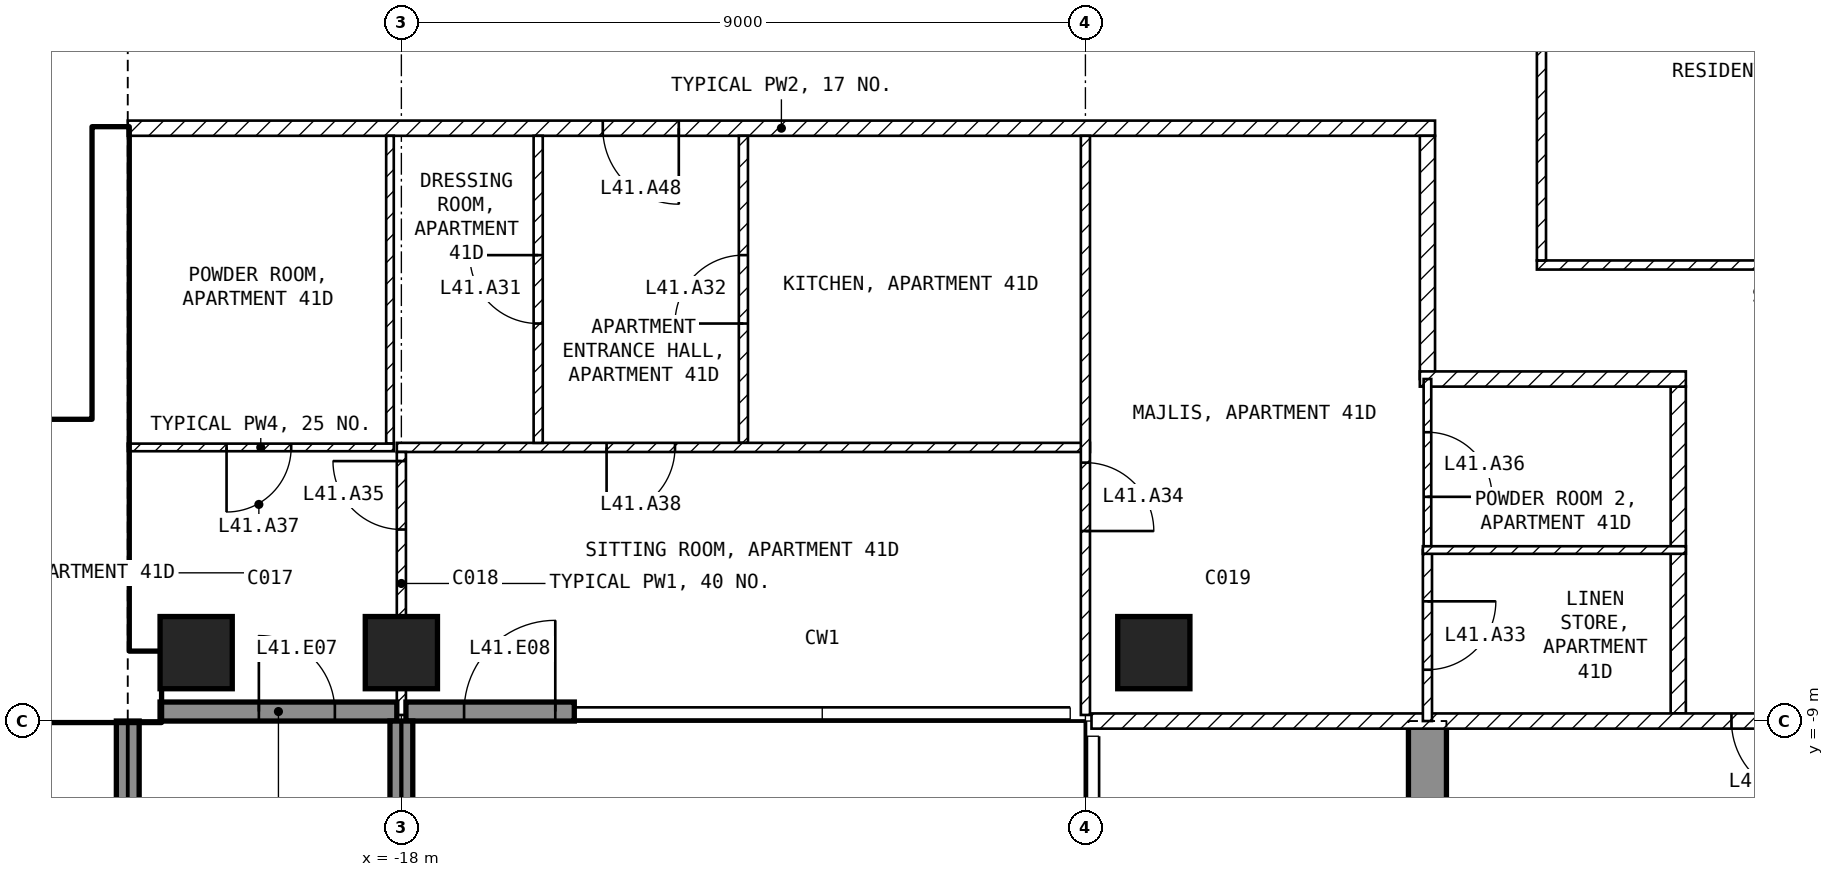
"""IFC4 building model, lengths in metres.
Left out: names, types, materials, properties, quantities, classifications, styles, units other than length and angle.
Written with IfcOpenShell. Run it as: python <this file> out.ifc"""

import sys

from ifc_helpers import new_model, si_unit, direction, frame, frame_2d, origin, origin_2d, place, context, subcontext, project, spatial, polyline, rectangle, outline, extrude, element, fill, save


model = new_model("IFC4")
c1 = context("Model", 3, precision=1e-05, world=origin(), true_north=direction((0.0, 1.0)))
c2 = subcontext(c1, "Body", "Model", "MODEL_VIEW")
j1 = project(units=[si_unit("LENGTHUNIT", "METRE"), si_unit("PLANEANGLEUNIT", "RADIAN")], contexts=[c1])
p1 = place(None, origin())
s1 = spatial("IfcSite", under=j1, at=p1, CompositionType="ELEMENT")
p2 = place(p1, origin())
s2 = spatial("IfcBuilding", under=s1, at=p2, CompositionType="ELEMENT")
p3 = place(p2, frame((0.0, 0.0, 170.1)))
s3 = spatial("IfcBuildingStorey", under=s2, at=p3, CompositionType="ELEMENT", Elevation=170.1)
for number, where, z_axis, x_axis in (
    (1, (-20.7, -8.1, -0.25), (0.0, 0.0, 1.0), (1.0, 0.0, 0.0)),
    (2, (-18.0, -8.1, -0.25), (0.0, 0.0, 1.0), (1.0, 0.0, 0.0)),
    (3, (-8.1, -8.1, -0.25), (0.0, 0.0, 1.0), (1.0, 0.0, 0.0)),
):
    element("IfcColumn", number, at=place(p3, frame(where, z_axis=z_axis, x_axis=x_axis)), inside=s3, PredefinedType="COLUMN", context=c2, shape_type="SweptSolid", body=[
        extrude(rectangle(XDim=0.95, YDim=0.95, at=origin_2d()), origin(), (0.0, 0.0, 1.0), 3.5),
    ])
p4 = place(p3, frame((-4.75, -20.225, -0.25), z_axis=(1.0, 0.0, 0.0), x_axis=(0.0, 1.0, 0.0)))
e4 = element("IfcWall", 4, at=p4, inside=s3, PredefinedType="SHEAR", context=c2, shape_type="SweptSolid", body=[
    extrude(outline(polyline([(0.0, 0.0), (6.725, 0.0), (6.725, 2.65), (9.125, 2.65), (9.125, 0.0), (11.225, 0.0), (11.225, 3.5), (0.0, 3.5), (0.0, 0.0)])), origin(), (0.0, 0.0, 1.0), 0.5),
])
p5 = place(p3, frame((-21.175, -8.875, 0.0), z_axis=(0.0, 0.0, 1.0), x_axis=(1.0, 0.0, 0.0)))
e5 = element("IfcWall", 5, at=p5, inside=s3, PredefinedType="SOLIDWALL", context=c2, shape_type="SweptSolid", body=[
    extrude(rectangle(XDim=3.115, YDim=0.25, at=frame_2d((1.558, 0.0))), origin(), (0.0, 0.0, 1.0), 3.25),
])
p6 = place(p5, frame((1.3, 0.0, 0.0)))
e6 = element("IfcOpeningElement", 6, at=p6, cuts=e5, PredefinedType="OPENING", context=c2, shape_type="SweptSolid", body=[
    extrude(rectangle(XDim=1.0, YDim=2.4, at=frame_2d((0.5, 1.2))), frame((0.0, 0.135, 0.0), z_axis=(0.0, -1.0, 0.0), x_axis=(1.0, 0.0, 0.0)), (0.0, 0.0, 1.0), 0.27),
])
p7 = place(p3, frame((-17.94, -8.875, 0.0), z_axis=(0.0, 0.0, 1.0), x_axis=(1.0, 0.0, 0.0)))
e7 = element("IfcWall", 7, at=p7, inside=s3, PredefinedType="SOLIDWALL", context=c2, shape_type="SweptSolid", body=[
    extrude(rectangle(XDim=2.215, YDim=0.25, at=frame_2d((1.107, 0.0))), origin(), (0.0, 0.0, 1.0), 3.25),
])
p8 = place(p7, frame((0.765, 0.0, 0.0)))
e8 = element("IfcOpeningElement", 8, at=p8, cuts=e7, PredefinedType="OPENING", context=c2, shape_type="SweptSolid", body=[
    extrude(rectangle(XDim=1.2, YDim=2.4, at=frame_2d((0.6, 1.2))), frame((0.0, 0.135, 0.0), z_axis=(0.0, -1.0, 0.0), x_axis=(1.0, 0.0, 0.0)), (0.0, 0.0, 1.0), 0.27),
])
for number, where, z_axis, x_axis in (
    (9, (-21.6, -9.0, 0.0), (0.0, 0.0, 1.0), (0.0, -1.0, 0.0)),
    (10, (-18.0, -9.0, 0.0), (0.0, 0.0, 1.0), (0.0, -1.0, 0.0)),
):
    element("IfcWall", number, at=place(p3, frame(where, z_axis=z_axis, x_axis=x_axis)), inside=s3, PredefinedType="SOLIDWALL", context=c2, shape_type="SweptSolid", body=[
        extrude(rectangle(XDim=2.7, YDim=0.3, at=frame_2d((1.35, 0.0))), origin(), (0.0, 0.0, 1.0), 3.25),
    ])
p9 = place(p3, frame((-30.2, -8.55, 0.0), z_axis=(0.0, 0.0, 1.0), x_axis=(1.0, 0.0, 0.0)))
e11 = element("IfcWall", 11, at=p9, inside=s3, PredefinedType="SHEAR", context=c2, shape_type="SweptSolid", body=[
    extrude(rectangle(XDim=9.025, YDim=0.9, at=frame_2d((4.512, 0.0))), origin(), (0.0, 0.0, 1.0), 3.25),
])
p10 = place(p3, frame((-21.825, -8.1, 0.0), z_axis=(0.0, 0.0, 1.0), x_axis=(0.0, 1.0, 0.0)))
e12 = element("IfcWall", 12, at=p10, inside=s3, PredefinedType="SHEAR", context=c2, shape_type="SweptSolid", body=[
    extrude(rectangle(XDim=6.9, YDim=0.45, at=frame_2d((3.45, 0.0))), origin(), (0.0, 0.0, 1.0), 3.25),
])
p11 = place(p3, frame((-28.35, -5.15, 0.0), z_axis=(0.0, 0.0, 1.0), x_axis=(1.0, 0.0, 0.0)))
e13 = element("IfcWall", 13, at=p11, inside=s3, PredefinedType="SOLIDWALL", context=c2, shape_type="SweptSolid", body=[
    extrude(rectangle(XDim=6.3, YDim=0.2, at=frame_2d((3.15, 0.0))), origin(), (0.0, 0.0, 1.0), 3.25),
])
p12 = place(p11, frame((5.1, 0.0, 0.0)))
e14 = element("IfcOpeningElement", 14, at=p12, cuts=e13, PredefinedType="OPENING", context=c2, shape_type="SweptSolid", body=[
    extrude(rectangle(XDim=1.0, YDim=2.1, at=frame_2d((0.5, 1.05))), frame((0.0, 0.11, 0.0), z_axis=(0.0, -1.0, 0.0), x_axis=(1.0, 0.0, 0.0)), (0.0, 0.0, 1.0), 0.22),
])
p13 = place(p3, frame((-3.06, -3.0, 0.0), z_axis=(0.0, 0.0, 1.0), x_axis=(1.0, 0.0, 0.0)))
e15 = element("IfcWall", 15, at=p13, inside=s3, PredefinedType="PARTITIONING", context=c2, shape_type="SweptSolid", body=[
    extrude(rectangle(XDim=6.12, YDim=0.12, at=frame_2d((3.06, 0.0))), origin(), (0.0, 0.0, 1.0), 3.25),
])
p14 = place(p3, frame((-3.0, 2.94, 0.0), z_axis=(0.0, 0.0, 1.0), x_axis=(0.0, -1.0, 0.0)))
e16 = element("IfcWall", 16, at=p14, inside=s3, PredefinedType="PARTITIONING", context=c2, shape_type="SweptSolid", body=[
    extrude(rectangle(XDim=5.88, YDim=0.12, at=frame_2d((2.94, 0.0))), origin(), (0.0, 0.0, 1.0), 3.25),
])
p15 = place(p3, frame((-4.4, -1.2, 0.0), z_axis=(0.0, 0.0, 1.0), x_axis=(-1.0, 0.0, 0.0)))
e17 = element("IfcWall", 17, at=p15, inside=s3, PredefinedType="PARTITIONING", context=c2, shape_type="SweptSolid", body=[
    extrude(rectangle(XDim=17.2, YDim=0.2, at=frame_2d((8.6, 0.0))), origin(), (0.0, 0.0, 1.0), 3.25),
])
p16 = place(p15, frame((9.95, 0.0, 0.0)))
e18 = element("IfcOpeningElement", 18, at=p16, cuts=e17, PredefinedType="OPENING", context=c2, shape_type="SweptSolid", body=[
    extrude(rectangle(XDim=1.0, YDim=2.1, at=frame_2d((0.5, 1.05))), frame((0.0, 0.11, 0.0), z_axis=(0.0, -1.0, 0.0), x_axis=(1.0, 0.0, 0.0)), (0.0, 0.0, 1.0), 0.22),
])
p17 = place(p3, frame((-4.5, -4.5, 0.0), z_axis=(0.0, 0.0, 1.0), x_axis=(0.0, 1.0, 0.0)))
e19 = element("IfcWall", 19, at=p17, inside=s3, PredefinedType="PARTITIONING", context=c2, shape_type="SweptSolid", body=[
    extrude(rectangle(XDim=3.2, YDim=0.2, at=frame_2d((1.6, 0.0))), origin(), (0.0, 0.0, 1.0), 3.25),
])
p18 = place(p3, frame((-1.2, -8.9, 0.0), z_axis=(0.0, 0.0, 1.0), x_axis=(0.0, 1.0, 0.0)))
e20 = element("IfcWall", 20, at=p18, inside=s3, PredefinedType="PARTITIONING", context=c2, shape_type="SweptSolid", body=[
    extrude(rectangle(XDim=4.3, YDim=0.2, at=frame_2d((2.15, 0.0))), origin(), (0.0, 0.0, 1.0), 3.25),
])
p19 = place(p3, frame((-1.1, -4.5, 0.0), z_axis=(0.0, 0.0, 1.0), x_axis=(-1.0, 0.0, 0.0)))
e21 = element("IfcWall", 21, at=p19, inside=s3, PredefinedType="PARTITIONING", context=c2, shape_type="SweptSolid", body=[
    extrude(rectangle(XDim=3.5, YDim=0.2, at=frame_2d((1.75, 0.0))), origin(), (0.0, 0.0, 1.0), 3.25),
])
p20 = place(p3, frame((8.92, -9.0, 0.0), z_axis=(0.0, 0.0, 1.0), x_axis=(-1.0, 0.0, 0.0)))
e22 = element("IfcWall", 22, at=p20, inside=s3, PredefinedType="PARTITIONING", context=c2, shape_type="SweptSolid", body=[
    extrude(rectangle(XDim=17.84, YDim=0.2, at=frame_2d((8.92, 0.0))), origin(), (0.0, 0.0, 1.0), 3.25),
])
p21 = place(p20, frame((8.42, 0.0, 0.0)))
e23 = element("IfcOpeningElement", 23, at=p21, cuts=e22, PredefinedType="OPENING", context=c2, shape_type="SweptSolid", body=[
    extrude(rectangle(XDim=1.0, YDim=2.1, at=frame_2d((0.5, 1.05))), frame((0.0, 0.11, 0.0), z_axis=(0.0, -1.0, 0.0), x_axis=(1.0, 0.0, 0.0)), (0.0, 0.0, 1.0), 0.22),
])
p22 = place(p3, frame((-13.5, -5.34, 0.0), z_axis=(0.0, 0.0, 1.0), x_axis=(0.0, 1.0, 0.0)))
e24 = element("IfcWall", 24, at=p22, inside=s3, PredefinedType="PARTITIONING", context=c2, shape_type="SweptSolid", body=[
    extrude(rectangle(XDim=4.04, YDim=0.12, at=frame_2d((2.02, 0.0))), origin(), (0.0, 0.0, 1.0), 3.25),
])
p23 = place(p22, frame((1.57, 0.0, 0.0)))
e25 = element("IfcOpeningElement", 25, at=p23, cuts=e24, PredefinedType="OPENING", context=c2, shape_type="SweptSolid", body=[
    extrude(rectangle(XDim=0.9, YDim=2.1, at=frame_2d((0.45, 1.05))), frame((0.0, 0.07, 0.0), z_axis=(0.0, -1.0, 0.0), x_axis=(1.0, 0.0, 0.0)), (0.0, 0.0, 1.0), 0.14),
])
p24 = place(p3, frame((-8.94, -5.4, 0.0), z_axis=(0.0, 0.0, 1.0), x_axis=(-1.0, 0.0, 0.0)))
e26 = element("IfcWall", 26, at=p24, inside=s3, PredefinedType="PARTITIONING", context=c2, shape_type="SweptSolid", body=[
    extrude(rectangle(XDim=9.12, YDim=0.12, at=frame_2d((4.56, 0.0))), origin(), (0.0, 0.0, 1.0), 3.25),
])
p25 = place(p24, frame((5.46, 0.0, 0.0)))
e27 = element("IfcOpeningElement", 27, at=p25, cuts=e26, PredefinedType="OPENING", context=c2, shape_type="SweptSolid", body=[
    extrude(rectangle(XDim=0.9, YDim=2.1, at=frame_2d((0.45, 1.05))), frame((0.0, 0.07, 0.0), z_axis=(0.0, -1.0, 0.0), x_axis=(1.0, 0.0, 0.0)), (0.0, 0.0, 1.0), 0.14),
])
p26 = place(p3, frame((-9.0, -1.3, 0.0), z_axis=(0.0, 0.0, 1.0), x_axis=(0.0, -1.0, 0.0)))
e28 = element("IfcWall", 28, at=p26, inside=s3, PredefinedType="PARTITIONING", context=c2, shape_type="SweptSolid", body=[
    extrude(rectangle(XDim=7.62, YDim=0.12, at=frame_2d((3.81, 0.0))), origin(), (0.0, 0.0, 1.0), 3.25),
])
p27 = place(p26, frame((4.3, 0.0, 0.0)))
e29 = element("IfcOpeningElement", 29, at=p27, cuts=e28, PredefinedType="OPENING", context=c2, shape_type="SweptSolid", body=[
    extrude(rectangle(XDim=0.9, YDim=2.1, at=frame_2d((0.45, 1.05))), frame((0.0, 0.07, 0.0), z_axis=(0.0, -1.0, 0.0), x_axis=(1.0, 0.0, 0.0)), (0.0, 0.0, 1.0), 0.14),
])
p28 = place(p3, frame((-16.2, -5.34, 0.0), z_axis=(0.0, 0.0, 1.0), x_axis=(0.0, 1.0, 0.0)))
e30 = element("IfcWall", 30, at=p28, inside=s3, PredefinedType="PARTITIONING", context=c2, shape_type="SweptSolid", body=[
    extrude(rectangle(XDim=4.04, YDim=0.12, at=frame_2d((2.02, 0.0))), origin(), (0.0, 0.0, 1.0), 3.25),
])
p29 = place(p28, frame((1.57, 0.0, 0.0)))
e31 = element("IfcOpeningElement", 31, at=p29, cuts=e30, PredefinedType="OPENING", context=c2, shape_type="SweptSolid", body=[
    extrude(rectangle(XDim=0.9, YDim=2.1, at=frame_2d((0.45, 1.05))), frame((0.0, 0.07, 0.0), z_axis=(0.0, -1.0, 0.0), x_axis=(1.0, 0.0, 0.0)), (0.0, 0.0, 1.0), 0.14),
])
p30 = place(p3, frame((-18.15, -5.35, 0.0), z_axis=(0.0, 0.0, 1.0), x_axis=(0.0, 1.0, 0.0)))
e32 = element("IfcWall", 32, at=p30, inside=s3, PredefinedType="PARTITIONING", context=c2, shape_type="SweptSolid", body=[
    extrude(rectangle(XDim=4.05, YDim=0.1, at=frame_2d((2.025, 0.0))), origin(), (0.0, 0.0, 1.0), 2.48),
])
p31 = place(p3, frame((-18.1, -5.4, 0.0), z_axis=(0.0, 0.0, 1.0), x_axis=(-1.0, 0.0, 0.0)))
e33 = element("IfcWall", 33, at=p31, inside=s3, PredefinedType="PARTITIONING", context=c2, shape_type="SweptSolid", body=[
    extrude(rectangle(XDim=3.5, YDim=0.1, at=frame_2d((1.75, 0.0))), origin(), (0.0, 0.0, 1.0), 3.25),
])
p32 = place(p31, frame((1.35, 0.0, 0.0)))
e34 = element("IfcOpeningElement", 34, at=p32, cuts=e33, PredefinedType="OPENING", context=c2, shape_type="SweptSolid", body=[
    extrude(rectangle(XDim=0.85, YDim=2.1, at=frame_2d((0.425, 1.05))), frame((0.0, 0.06, 0.0), z_axis=(0.0, -1.0, 0.0), x_axis=(1.0, 0.0, 0.0)), (0.0, 0.0, 1.0), 0.12),
])
p33 = place(p3, frame((-18.0, -8.92, 0.0), z_axis=(0.0, 0.0, 1.0), x_axis=(0.0, 1.0, 0.0)))
e35 = element("IfcWall", 35, at=p33, inside=s3, PredefinedType="PARTITIONING", context=c2, shape_type="SweptSolid", body=[
    extrude(rectangle(XDim=3.46, YDim=0.12, at=frame_2d((1.73, 0.0))), origin(), (0.0, 0.0, 1.0), 2.48),
])
p34 = place(p33, frame((2.44, 0.0, 0.0)))
e36 = element("IfcOpeningElement", 36, at=p34, cuts=e35, PredefinedType="OPENING", context=c2, shape_type="SweptSolid", body=[
    extrude(rectangle(XDim=0.9, YDim=2.1, at=frame_2d((0.45, 1.05))), frame((0.0, 0.07, 0.0), z_axis=(0.0, -1.0, 0.0), x_axis=(1.0, 0.0, 0.0)), (0.0, 0.0, 1.0), 0.14),
])
p35 = place(p3, frame((-4.5, -4.5, 0.0), z_axis=(0.0, 0.0, 1.0), x_axis=(0.0, -1.0, 0.0)))
e37 = element("IfcWall", 37, at=p35, inside=s3, PredefinedType="PARTITIONING", context=c2, shape_type="SweptSolid", body=[
    extrude(rectangle(XDim=2.25, YDim=0.1, at=frame_2d((1.125, 0.0))), origin(), (0.0, 0.0, 1.0), 3.25),
])
p36 = place(p35, frame((0.7, 0.0, 0.0)))
e38 = element("IfcOpeningElement", 38, at=p36, cuts=e37, PredefinedType="OPENING", context=c2, shape_type="SweptSolid", body=[
    extrude(rectangle(XDim=0.85, YDim=2.1, at=frame_2d((0.425, 1.05))), frame((0.0, 0.06, 0.0), z_axis=(0.0, -1.0, 0.0), x_axis=(1.0, 0.0, 0.0)), (0.0, 0.0, 1.0), 0.12),
])
p37 = place(p3, frame((-4.5, -6.75, 0.0), z_axis=(0.0, 0.0, 1.0), x_axis=(0.0, -1.0, 0.0)))
e39 = element("IfcWall", 39, at=p37, inside=s3, PredefinedType="PARTITIONING", context=c2, shape_type="SweptSolid", body=[
    extrude(rectangle(XDim=2.25, YDim=0.12, at=frame_2d((1.125, 0.0))), origin(), (0.0, 0.0, 1.0), 3.25),
])
p38 = place(p37, frame((0.675, 0.0, 0.0)))
e40 = element("IfcOpeningElement", 40, at=p38, cuts=e39, PredefinedType="OPENING", context=c2, shape_type="SweptSolid", body=[
    extrude(rectangle(XDim=0.9, YDim=2.1, at=frame_2d((0.45, 1.05))), frame((0.0, 0.07, 0.0), z_axis=(0.0, -1.0, 0.0), x_axis=(1.0, 0.0, 0.0)), (0.0, 0.0, 1.0), 0.14),
])
p39 = place(p3, frame((-1.1, -6.75, 0.0), z_axis=(0.0, 0.0, 1.0), x_axis=(-1.0, 0.0, 0.0)))
e41 = element("IfcWall", 41, at=p39, inside=s3, PredefinedType="PARTITIONING", context=c2, shape_type="SweptSolid", body=[
    extrude(rectangle(XDim=3.46, YDim=0.1, at=frame_2d((1.73, 0.0))), origin(), (0.0, 0.0, 1.0), 3.25),
])
p40 = place(p6, origin())
e42 = element("IfcDoor", 42, at=p40, inside=s3, OperationType="SINGLE_SWING_LEFT", PredefinedType="DOOR", context=c2, shape_type="SweptSolid", body=[
    extrude(rectangle(XDim=1.0, YDim=2.4, at=frame_2d((0.5, 1.2))), frame((0.0, 0.025, 0.0), z_axis=(0.0, -1.0, 0.0), x_axis=(1.0, 0.0, 0.0)), (0.0, 0.0, 1.0), 0.05),
])
fill(e6, e42)
p41 = place(p8, origin())
e43 = element("IfcDoor", 43, at=p41, inside=s3, OperationType="SINGLE_SWING_RIGHT", PredefinedType="DOOR", context=c2, shape_type="SweptSolid", body=[
    extrude(rectangle(XDim=1.2, YDim=2.4, at=frame_2d((0.6, 1.2))), frame((0.0, 0.025, 0.0), z_axis=(0.0, -1.0, 0.0), x_axis=(1.0, 0.0, 0.0)), (0.0, 0.0, 1.0), 0.05),
])
fill(e8, e43)
p42 = place(p12, origin())
e44 = element("IfcDoor", 44, at=p42, inside=s3, OperationType="SINGLE_SWING_LEFT", PredefinedType="DOOR", context=c2, shape_type="SweptSolid", body=[
    extrude(rectangle(XDim=1.0, YDim=2.1, at=frame_2d((0.5, 1.05))), frame((0.0, 0.025, 0.0), z_axis=(0.0, -1.0, 0.0), x_axis=(1.0, 0.0, 0.0)), (0.0, 0.0, 1.0), 0.05),
])
fill(e14, e44)
p43 = place(p29, origin())
e45 = element("IfcDoor", 45, at=p43, inside=s3, OperationType="SINGLE_SWING_RIGHT", PredefinedType="DOOR", context=c2, shape_type="SweptSolid", body=[
    extrude(rectangle(XDim=0.9, YDim=2.1, at=frame_2d((0.45, 1.05))), frame((0.0, 0.025, 0.0), z_axis=(0.0, -1.0, 0.0), x_axis=(1.0, 0.0, 0.0)), (0.0, 0.0, 1.0), 0.05),
])
fill(e31, e45)
p44 = place(p23, origin())
e46 = element("IfcDoor", 46, at=p44, inside=s3, OperationType="SINGLE_SWING_LEFT", PredefinedType="DOOR", context=c2, shape_type="SweptSolid", body=[
    extrude(rectangle(XDim=0.9, YDim=2.1, at=frame_2d((0.45, 1.05))), frame((0.0, 0.025, 0.0), z_axis=(0.0, -1.0, 0.0), x_axis=(1.0, 0.0, 0.0)), (0.0, 0.0, 1.0), 0.05),
])
fill(e25, e46)
p45 = place(p38, origin())
e47 = element("IfcDoor", 47, at=p45, inside=s3, OperationType="SINGLE_SWING_LEFT", PredefinedType="DOOR", context=c2, shape_type="SweptSolid", body=[
    extrude(rectangle(XDim=0.9, YDim=2.1, at=frame_2d((0.45, 1.05))), frame((0.0, 0.025, 0.0), z_axis=(0.0, -1.0, 0.0), x_axis=(1.0, 0.0, 0.0)), (0.0, 0.0, 1.0), 0.05),
])
fill(e40, e47)
p46 = place(p27, origin())
e48 = element("IfcDoor", 48, at=p46, inside=s3, OperationType="SINGLE_SWING_RIGHT", PredefinedType="DOOR", context=c2, shape_type="SweptSolid", body=[
    extrude(rectangle(XDim=0.9, YDim=2.1, at=frame_2d((0.45, 1.05))), frame((0.0, 0.025, 0.0), z_axis=(0.0, -1.0, 0.0), x_axis=(1.0, 0.0, 0.0)), (0.0, 0.0, 1.0), 0.05),
])
fill(e29, e48)
p47 = place(p34, origin())
e49 = element("IfcDoor", 49, at=p47, inside=s3, OperationType="SINGLE_SWING_RIGHT", PredefinedType="DOOR", context=c2, shape_type="SweptSolid", body=[
    extrude(rectangle(XDim=0.9, YDim=2.1, at=frame_2d((0.45, 1.05))), frame((0.0, 0.025, 0.0), z_axis=(0.0, -1.0, 0.0), x_axis=(1.0, 0.0, 0.0)), (0.0, 0.0, 1.0), 0.05),
])
fill(e36, e49)
p48 = place(p36, origin())
e50 = element("IfcDoor", 50, at=p48, inside=s3, OperationType="SINGLE_SWING_RIGHT", PredefinedType="DOOR", context=c2, shape_type="SweptSolid", body=[
    extrude(rectangle(XDim=0.85, YDim=2.1, at=frame_2d((0.425, 1.05))), frame((0.0, 0.025, 0.0), z_axis=(0.0, -1.0, 0.0), x_axis=(1.0, 0.0, 0.0)), (0.0, 0.0, 1.0), 0.05),
])
fill(e38, e50)
p49 = place(p32, origin())
e51 = element("IfcDoor", 51, at=p49, inside=s3, OperationType="SINGLE_SWING_RIGHT", PredefinedType="DOOR", context=c2, shape_type="SweptSolid", body=[
    extrude(rectangle(XDim=0.85, YDim=2.1, at=frame_2d((0.425, 1.05))), frame((0.0, 0.025, 0.0), z_axis=(0.0, -1.0, 0.0), x_axis=(1.0, 0.0, 0.0)), (0.0, 0.0, 1.0), 0.05),
])
fill(e34, e51)
p50 = place(p25, origin())
e52 = element("IfcDoor", 52, at=p50, inside=s3, OperationType="SINGLE_SWING_RIGHT", PredefinedType="DOOR", context=c2, shape_type="SweptSolid", body=[
    extrude(rectangle(XDim=0.9, YDim=2.1, at=frame_2d((0.45, 1.05))), frame((0.0, 0.025, 0.0), z_axis=(0.0, -1.0, 0.0), x_axis=(1.0, 0.0, 0.0)), (0.0, 0.0, 1.0), 0.05),
])
fill(e27, e52)
p51 = place(p21, origin())
e53 = element("IfcDoor", 53, at=p51, inside=s3, OperationType="SINGLE_SWING_LEFT", PredefinedType="DOOR", context=c2, shape_type="SweptSolid", body=[
    extrude(rectangle(XDim=1.0, YDim=2.1, at=frame_2d((0.5, 1.05))), frame((0.0, 0.025, 0.0), z_axis=(0.0, -1.0, 0.0), x_axis=(1.0, 0.0, 0.0)), (0.0, 0.0, 1.0), 0.05),
])
fill(e23, e53)
p52 = place(p16, origin())
e54 = element("IfcDoor", 54, at=p52, inside=s3, OperationType="SINGLE_SWING_LEFT", PredefinedType="DOOR", context=c2, shape_type="SweptSolid", body=[
    extrude(rectangle(XDim=1.0, YDim=2.1, at=frame_2d((0.5, 1.05))), frame((0.0, 0.025, 0.0), z_axis=(0.0, -1.0, 0.0), x_axis=(1.0, 0.0, 0.0)), (0.0, 0.0, 1.0), 0.05),
])
fill(e18, e54)
save(model, sys.argv[1])
